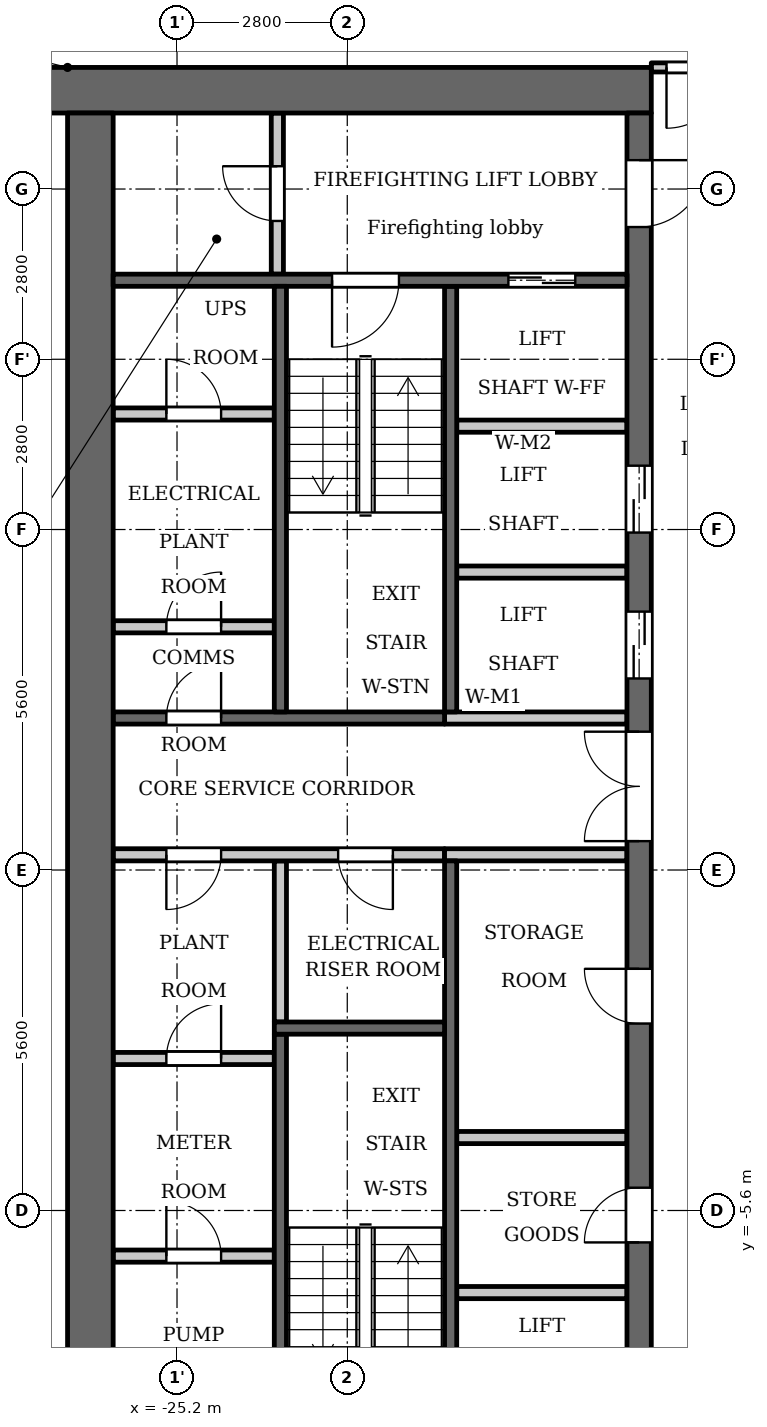
"""IFC4 building model, lengths in metres.
Left out: names, types, materials, properties, quantities, classifications, styles, units other than length and angle.
Written with IfcOpenShell. Run it as: python <this file> out.ifc"""

import sys

from ifc_helpers import new_model, si_unit, direction, frame, frame_2d, origin, place, context, subcontext, project, spatial, rectangle, extrude, element, fill, save


model = new_model("IFC4")
c1 = context("Model", 3, precision=1e-05, world=origin(), true_north=direction((0.0, 1.0)))
c2 = subcontext(c1, "Body", "Model", "MODEL_VIEW")
j1 = project(units=[si_unit("LENGTHUNIT", "METRE"), si_unit("PLANEANGLEUNIT", "RADIAN")], contexts=[c1])
p1 = place(None, origin())
s1 = spatial("IfcSite", under=j1, at=p1, CompositionType="ELEMENT")
p2 = place(p1, origin())
s2 = spatial("IfcBuilding", under=s1, at=p2, CompositionType="ELEMENT")
p3 = place(p2, frame((0.0, 0.0, 146.6)))
s3 = spatial("IfcBuildingStorey", under=s2, at=p3, CompositionType="ELEMENT", Elevation=146.6)
p4 = place(p3, frame((-23.5, -2.5, 0.0), z_axis=(0.0, 0.0, 1.0), x_axis=(0.0, 1.0, 0.0)))
e1 = element("IfcWall", 1, at=p4, inside=s3, PredefinedType="PARTITIONING", context=c2, shape_type="SweptSolid", body=[
    extrude(rectangle(XDim=2.65, YDim=0.2, at=frame_2d((1.325, 0.0))), origin(), (0.0, 0.0, 1.0), 3.2),
])
p5 = place(p3, frame((-20.7, 2.6, 0.0), z_axis=(0.0, 0.0, 1.0), x_axis=(0.0, 1.0, 0.0)))
e2 = element("IfcWall", 2, at=p5, inside=s3, PredefinedType="SHEAR", context=c2, shape_type="SweptSolid", body=[
    extrude(rectangle(XDim=7.0, YDim=0.2, at=frame_2d((3.5, 0.0))), origin(), (0.0, 0.0, 1.0), 3.2),
])
p6 = place(p3, frame((-20.7, -9.6, 0.0), z_axis=(0.0, 0.0, 1.0), x_axis=(0.0, 1.0, 0.0)))
e3 = element("IfcWall", 3, at=p6, inside=s3, PredefinedType="SHEAR", context=c2, shape_type="SweptSolid", body=[
    extrude(rectangle(XDim=9.75, YDim=0.2, at=frame_2d((4.875, 0.0))), origin(), (0.0, 0.0, 1.0), 3.2),
])
p7 = place(p3, frame((-20.8, 2.5, 0.0), z_axis=(0.0, 0.0, 1.0), x_axis=(-1.0, 0.0, 0.0)))
e4 = element("IfcWall", 4, at=p7, inside=s3, PredefinedType="SHEAR", context=c2, shape_type="SweptSolid", body=[
    extrude(rectangle(XDim=5.45, YDim=0.2, at=frame_2d((2.725, 0.0))), origin(), (0.0, 0.0, 1.0), 3.2),
])
p8 = place(p7, frame((3.675, 0.0, 0.0)))
e5 = element("IfcOpeningElement", 5, at=p8, cuts=e4, PredefinedType="OPENING", context=c2, shape_type="SweptSolid", body=[
    extrude(rectangle(XDim=0.9, YDim=2.1, at=frame_2d((0.45, 1.05))), frame((0.0, 0.11, 0.0), z_axis=(0.0, -1.0, 0.0), x_axis=(1.0, 0.0, 0.0)), (0.0, 0.0, 1.0), 0.22),
])
p9 = place(p3, frame((-20.8, 0.25, 0.0), z_axis=(0.0, 0.0, 1.0), x_axis=(-1.0, 0.0, 0.0)))
e6 = element("IfcWall", 6, at=p9, inside=s3, PredefinedType="PARTITIONING", context=c2, shape_type="SweptSolid", body=[
    extrude(rectangle(XDim=5.45, YDim=0.2, at=frame_2d((2.725, 0.0))), origin(), (0.0, 0.0, 1.0), 3.2),
])
p10 = place(p9, frame((0.85, 0.0, 0.0)))
e7 = element("IfcOpeningElement", 7, at=p10, cuts=e6, PredefinedType="OPENING", context=c2, shape_type="SweptSolid", body=[
    extrude(rectangle(XDim=0.9, YDim=2.1, at=frame_2d((0.45, 1.05))), frame((0.0, 0.11, 0.0), z_axis=(0.0, -1.0, 0.0), x_axis=(1.0, 0.0, 0.0)), (0.0, 0.0, 1.0), 0.22),
])
p11 = place(p9, frame((3.675, 0.0, 0.0)))
e8 = element("IfcOpeningElement", 8, at=p11, cuts=e6, PredefinedType="OPENING", context=c2, shape_type="SweptSolid", body=[
    extrude(rectangle(XDim=0.9, YDim=2.1, at=frame_2d((0.45, 1.05))), frame((0.0, 0.11, 0.0), z_axis=(0.0, -1.0, 0.0), x_axis=(1.0, 0.0, 0.0)), (0.0, 0.0, 1.0), 0.22),
])
p12 = place(p3, frame((-17.4, 12.825, 0.0), z_axis=(0.0, 0.0, 1.0), x_axis=(-1.0, 0.0, 0.0)))
e9 = element("IfcWall", 9, at=p12, inside=s3, PredefinedType="SHEAR", context=c2, shape_type="SweptSolid", body=[
    extrude(rectangle(XDim=10.4, YDim=0.75, at=frame_2d((5.2, 0.0))), origin(), (0.0, 0.0, 1.0), 3.2),
])
p13 = place(p3, frame((-17.8, -4.4, 0.0), z_axis=(0.0, 0.0, 1.0), x_axis=(-1.0, 0.0, 0.0)))
e10 = element("IfcWall", 10, at=p13, inside=s3, PredefinedType="PARTITIONING", context=c2, shape_type="SweptSolid", body=[
    extrude(rectangle(XDim=2.8, YDim=0.2, at=frame_2d((1.4, 0.0))), origin(), (0.0, 0.0, 1.0), 3.2),
])
p14 = place(p3, frame((-17.6, -12.45, 0.0), z_axis=(0.0, 0.0, 1.0), x_axis=(0.0, 1.0, 0.0)))
e11 = element("IfcWall", 11, at=p14, inside=s3, PredefinedType="SHEAR", context=c2, shape_type="SweptSolid", body=[
    extrude(rectangle(XDim=24.9, YDim=0.4, at=frame_2d((12.45, 0.0))), origin(), (0.0, 0.0, 1.0), 3.2),
])
p15 = place(p14, frame((6.325, 0.0, 0.0)))
e12 = element("IfcOpeningElement", 12, at=p15, cuts=e11, PredefinedType="OPENING", context=c2, shape_type="SweptSolid", body=[
    extrude(rectangle(XDim=0.9, YDim=2.1, at=frame_2d((0.45, 1.05))), frame((0.0, 0.21, 0.0), z_axis=(0.0, -1.0, 0.0), x_axis=(1.0, 0.0, 0.0)), (0.0, 0.0, 1.0), 0.42),
])
p16 = place(p14, frame((9.925, 0.0, 0.0)))
e13 = element("IfcOpeningElement", 13, at=p16, cuts=e11, PredefinedType="OPENING", context=c2, shape_type="SweptSolid", body=[
    extrude(rectangle(XDim=0.9, YDim=2.1, at=frame_2d((0.45, 1.05))), frame((0.0, 0.21, 0.0), z_axis=(0.0, -1.0, 0.0), x_axis=(1.0, 0.0, 0.0)), (0.0, 0.0, 1.0), 0.42),
])
p17 = place(p14, frame((15.6, 0.0, 0.0)))
e14 = element("IfcOpeningElement", 14, at=p17, cuts=e11, PredefinedType="OPENING", context=c2, shape_type="SweptSolid", body=[
    extrude(rectangle(XDim=1.1, YDim=2.1, at=frame_2d((0.55, 1.05))), frame((0.0, 0.21, 0.0), z_axis=(0.0, -1.0, 0.0), x_axis=(1.0, 0.0, 0.0)), (0.0, 0.0, 1.0), 0.42),
])
p18 = place(p14, frame((18.0, 0.0, 0.0)))
e15 = element("IfcOpeningElement", 15, at=p18, cuts=e11, PredefinedType="OPENING", context=c2, shape_type="SweptSolid", body=[
    extrude(rectangle(XDim=1.1, YDim=2.1, at=frame_2d((0.55, 1.05))), frame((0.0, 0.21, 0.0), z_axis=(0.0, -1.0, 0.0), x_axis=(1.0, 0.0, 0.0)), (0.0, 0.0, 1.0), 0.42),
])
p19 = place(p14, frame((23.025, 0.0, 0.0)))
e16 = element("IfcOpeningElement", 16, at=p19, cuts=e11, PredefinedType="OPENING", context=c2, shape_type="SweptSolid", body=[
    extrude(rectangle(XDim=1.1, YDim=2.1, at=frame_2d((0.55, 1.05))), frame((0.0, 0.21, 0.0), z_axis=(0.0, -1.0, 0.0), x_axis=(1.0, 0.0, 0.0)), (0.0, 0.0, 1.0), 0.42),
])
p20 = place(p14, frame((0.775, 0.0, 0.0)))
e17 = element("IfcOpeningElement", 17, at=p20, cuts=e11, PredefinedType="OPENING", context=c2, shape_type="SweptSolid", body=[
    extrude(rectangle(XDim=1.1, YDim=2.1, at=frame_2d((0.55, 1.05))), frame((0.0, 0.21, 0.0), z_axis=(0.0, -1.0, 0.0), x_axis=(1.0, 0.0, 0.0)), (0.0, 0.0, 1.0), 0.42),
])
p21 = place(p14, frame((12.925, 0.0, 0.0)))
e18 = element("IfcOpeningElement", 18, at=p21, cuts=e11, PredefinedType="OPENING", context=c2, shape_type="SweptSolid", body=[
    extrude(rectangle(XDim=1.8, YDim=2.1, at=frame_2d((0.9, 1.05))), frame((0.0, 0.21, 0.0), z_axis=(0.0, -1.0, 0.0), x_axis=(1.0, 0.0, 0.0)), (0.0, 0.0, 1.0), 0.42),
])
p22 = place(p3, frame((-26.625, -12.45, 0.0), z_axis=(0.0, 0.0, 1.0), x_axis=(0.0, 1.0, 0.0)))
e19 = element("IfcWall", 19, at=p22, inside=s3, PredefinedType="SHEAR", context=c2, shape_type="SweptSolid", body=[
    extrude(rectangle(XDim=24.9, YDim=0.75, at=frame_2d((12.45, 0.0))), origin(), (0.0, 0.0, 1.0), 3.2),
])
p23 = place(p3, frame((-23.55, 9.8, 0.0), z_axis=(0.0, 0.0, 1.0), x_axis=(0.0, 1.0, 0.0)))
e20 = element("IfcWall", 20, at=p23, inside=s3, PredefinedType="PARTITIONING", context=c2, shape_type="SweptSolid", body=[
    extrude(rectangle(XDim=2.65, YDim=0.2, at=frame_2d((1.325, 0.0))), origin(), (0.0, 0.0, 1.0), 3.2),
])
p24 = place(p23, frame((0.875, 0.0, 0.0)))
e21 = element("IfcOpeningElement", 21, at=p24, cuts=e20, PredefinedType="OPENING", context=c2, shape_type="SweptSolid", body=[
    extrude(rectangle(XDim=0.9, YDim=2.1, at=frame_2d((0.45, 1.05))), frame((0.0, 0.11, 0.0), z_axis=(0.0, -1.0, 0.0), x_axis=(1.0, 0.0, 0.0)), (0.0, 0.0, 1.0), 0.22),
])
p25 = place(p3, frame((-23.6, -6.35, 0.0), z_axis=(0.0, 0.0, 1.0), x_axis=(-1.0, 0.0, 0.0)))
e22 = element("IfcWall", 22, at=p25, inside=s3, PredefinedType="PARTITIONING", context=c2, shape_type="SweptSolid", body=[
    extrude(rectangle(XDim=2.65, YDim=0.2, at=frame_2d((1.325, 0.0))), origin(), (0.0, 0.0, 1.0), 3.2),
])
p26 = place(p25, frame((0.875, 0.0, 0.0)))
e23 = element("IfcOpeningElement", 23, at=p26, cuts=e22, PredefinedType="OPENING", context=c2, shape_type="SweptSolid", body=[
    extrude(rectangle(XDim=0.9, YDim=2.1, at=frame_2d((0.45, 1.05))), frame((0.0, 0.11, 0.0), z_axis=(0.0, -1.0, 0.0), x_axis=(1.0, 0.0, 0.0)), (0.0, 0.0, 1.0), 0.22),
])
p27 = place(p3, frame((-23.6, -3.1, 0.0), z_axis=(0.0, 0.0, 1.0), x_axis=(-1.0, 0.0, 0.0)))
e24 = element("IfcWall", 24, at=p27, inside=s3, PredefinedType="PARTITIONING", context=c2, shape_type="SweptSolid", body=[
    extrude(rectangle(XDim=2.65, YDim=0.2, at=frame_2d((1.325, 0.0))), origin(), (0.0, 0.0, 1.0), 3.2),
])
p28 = place(p27, frame((0.875, 0.0, 0.0)))
e25 = element("IfcOpeningElement", 25, at=p28, cuts=e24, PredefinedType="OPENING", context=c2, shape_type="SweptSolid", body=[
    extrude(rectangle(XDim=0.9, YDim=2.1, at=frame_2d((0.45, 1.05))), frame((0.0, 0.11, 0.0), z_axis=(0.0, -1.0, 0.0), x_axis=(1.0, 0.0, 0.0)), (0.0, 0.0, 1.0), 0.22),
])
p29 = place(p3, frame((-23.6, 4.0, 0.0), z_axis=(0.0, 0.0, 1.0), x_axis=(-1.0, 0.0, 0.0)))
e26 = element("IfcWall", 26, at=p29, inside=s3, PredefinedType="PARTITIONING", context=c2, shape_type="SweptSolid", body=[
    extrude(rectangle(XDim=2.65, YDim=0.2, at=frame_2d((1.325, 0.0))), origin(), (0.0, 0.0, 1.0), 3.2),
])
p30 = place(p29, frame((0.875, 0.0, 0.0)))
e27 = element("IfcOpeningElement", 27, at=p30, cuts=e26, PredefinedType="OPENING", context=c2, shape_type="SweptSolid", body=[
    extrude(rectangle(XDim=0.9, YDim=2.1, at=frame_2d((0.45, 1.05))), frame((0.0, 0.11, 0.0), z_axis=(0.0, -1.0, 0.0), x_axis=(1.0, 0.0, 0.0)), (0.0, 0.0, 1.0), 0.22),
])
p31 = place(p3, frame((-23.6, 7.5, 0.0), z_axis=(0.0, 0.0, 1.0), x_axis=(-1.0, 0.0, 0.0)))
e28 = element("IfcWall", 28, at=p31, inside=s3, PredefinedType="PARTITIONING", context=c2, shape_type="SweptSolid", body=[
    extrude(rectangle(XDim=2.65, YDim=0.2, at=frame_2d((1.325, 0.0))), origin(), (0.0, 0.0, 1.0), 3.2),
])
p32 = place(p31, frame((0.875, 0.0, 0.0)))
e29 = element("IfcOpeningElement", 29, at=p32, cuts=e28, PredefinedType="OPENING", context=c2, shape_type="SweptSolid", body=[
    extrude(rectangle(XDim=0.9, YDim=2.1, at=frame_2d((0.45, 1.05))), frame((0.0, 0.11, 0.0), z_axis=(0.0, -1.0, 0.0), x_axis=(1.0, 0.0, 0.0)), (0.0, 0.0, 1.0), 0.22),
])
p33 = place(p3, frame((-17.8, -6.95, 0.0), z_axis=(0.0, 0.0, 1.0), x_axis=(-1.0, 0.0, 0.0)))
e30 = element("IfcWall", 30, at=p33, inside=s3, PredefinedType="PARTITIONING", context=c2, shape_type="SweptSolid", body=[
    extrude(rectangle(XDim=2.8, YDim=0.2, at=frame_2d((1.4, 0.0))), origin(), (0.0, 0.0, 1.0), 3.2),
])
for number, where, z_axis, x_axis in (
    (31, (-17.8, 0.25, 0.0), (0.0, 0.0, 1.0), (-1.0, 0.0, 0.0)),
    (32, (-17.8, 2.5, 0.0), (0.0, 0.0, 1.0), (-1.0, 0.0, 0.0)),
):
    element("IfcWall", number, at=place(p3, frame(where, z_axis=z_axis, x_axis=x_axis)), inside=s3, PredefinedType="PARTITIONING", context=c2, shape_type="SweptSolid", body=[
        extrude(rectangle(XDim=3.0, YDim=0.2, at=frame_2d((1.5, 0.0))), origin(), (0.0, 0.0, 1.0), 3.2),
    ])
for number, where, z_axis, x_axis in (
    (33, (-17.8, 4.9, 0.0), (0.0, 0.0, 1.0), (-1.0, 0.0, 0.0)),
    (34, (-17.8, 7.3, 0.0), (0.0, 0.0, 1.0), (-1.0, 0.0, 0.0)),
):
    element("IfcWall", number, at=place(p3, frame(where, z_axis=z_axis, x_axis=x_axis)), inside=s3, PredefinedType="PARTITIONING", context=c2, shape_type="SweptSolid", body=[
        extrude(rectangle(XDim=2.8, YDim=0.2, at=frame_2d((1.4, 0.0))), origin(), (0.0, 0.0, 1.0), 3.2),
    ])
p34 = place(p3, frame((-17.8, 9.7, 0.0), z_axis=(0.0, 0.0, 1.0), x_axis=(-1.0, 0.0, 0.0)))
e35 = element("IfcWall", 35, at=p34, inside=s3, PredefinedType="SHEAR", context=c2, shape_type="SweptSolid", body=[
    extrude(rectangle(XDim=8.45, YDim=0.2, at=frame_2d((4.225, 0.0))), origin(), (0.0, 0.0, 1.0), 3.2),
])
p35 = place(p34, frame((0.85, 0.0, 0.0)))
e36 = element("IfcOpeningElement", 36, at=p35, cuts=e35, PredefinedType="OPENING", context=c2, shape_type="SweptSolid", body=[
    extrude(rectangle(XDim=1.1, YDim=2.1, at=frame_2d((0.55, 1.05))), frame((0.0, 0.11, 0.0), z_axis=(0.0, -1.0, 0.0), x_axis=(1.0, 0.0, 0.0)), (0.0, 0.0, 1.0), 0.22),
])
p36 = place(p34, frame((3.75, 0.0, 0.0)))
e37 = element("IfcOpeningElement", 37, at=p36, cuts=e35, PredefinedType="OPENING", context=c2, shape_type="SweptSolid", body=[
    extrude(rectangle(XDim=1.1, YDim=2.1, at=frame_2d((0.55, 1.05))), frame((0.0, 0.11, 0.0), z_axis=(0.0, -1.0, 0.0), x_axis=(1.0, 0.0, 0.0)), (0.0, 0.0, 1.0), 0.22),
])
p37 = place(p3, frame((-23.5, 2.6, 0.0), z_axis=(0.0, 0.0, 1.0), x_axis=(0.0, 1.0, 0.0)))
e38 = element("IfcWall", 38, at=p37, inside=s3, PredefinedType="SHEAR", context=c2, shape_type="SweptSolid", body=[
    extrude(rectangle(XDim=7.0, YDim=0.2, at=frame_2d((3.5, 0.0))), origin(), (0.0, 0.0, 1.0), 3.2),
])
p38 = place(p3, frame((-23.5, -9.6, 0.0), z_axis=(0.0, 0.0, 1.0), x_axis=(0.0, 1.0, 0.0)))
e39 = element("IfcWall", 39, at=p38, inside=s3, PredefinedType="SHEAR", context=c2, shape_type="SweptSolid", body=[
    extrude(rectangle(XDim=6.9, YDim=0.2, at=frame_2d((3.45, 0.0))), origin(), (0.0, 0.0, 1.0), 3.2),
])
p39 = place(p3, frame((-20.8, -2.6, 0.0), z_axis=(0.0, 0.0, 1.0), x_axis=(-1.0, 0.0, 0.0)))
e40 = element("IfcWall", 40, at=p39, inside=s3, PredefinedType="SHEAR", context=c2, shape_type="SweptSolid", body=[
    extrude(rectangle(XDim=2.8, YDim=0.2, at=frame_2d((1.4, 0.0))), origin(), (0.0, 0.0, 1.0), 3.2),
])
p40 = place(p3, frame((-17.4, 13.2, 0.0), z_axis=(0.0, 0.0, 1.0), x_axis=(1.0, 0.0, 0.0)))
e41 = element("IfcWall", 41, at=p40, inside=s3, PredefinedType="PARTITIONING", context=c2, shape_type="SweptSolid", body=[
    extrude(rectangle(XDim=34.8, YDim=0.15, at=frame_2d((17.4, 0.0))), origin(), (0.0, 0.0, 1.0), 3.2),
])
p41 = place(p40, frame((0.25, 0.0, 0.0)))
e42 = element("IfcOpeningElement", 42, at=p41, cuts=e41, PredefinedType="OPENING", context=c2, shape_type="SweptSolid", body=[
    extrude(rectangle(XDim=1.0, YDim=2.1, at=frame_2d((0.5, 1.05))), frame((0.0, 0.085, 0.0), z_axis=(0.0, -1.0, 0.0), x_axis=(1.0, 0.0, 0.0)), (0.0, 0.0, 1.0), 0.17),
])
p42 = place(p40, frame((33.65, 0.0, 0.0)))
e43 = element("IfcOpeningElement", 43, at=p42, cuts=e41, PredefinedType="OPENING", context=c2, shape_type="SweptSolid", body=[
    extrude(rectangle(XDim=1.0, YDim=2.1, at=frame_2d((0.5, 1.05))), frame((0.0, 0.085, 0.0), z_axis=(0.0, -1.0, 0.0), x_axis=(1.0, 0.0, 0.0)), (0.0, 0.0, 1.0), 0.17),
])
p43 = place(p40, frame((13.75, 0.0, 0.0)))
e44 = element("IfcOpeningElement", 44, at=p43, cuts=e41, PredefinedType="OPENING", context=c2, shape_type="SweptSolid", body=[
    extrude(rectangle(XDim=1.0, YDim=2.1, at=frame_2d((0.5, 1.05))), frame((0.0, 0.085, 0.0), z_axis=(0.0, -1.0, 0.0), x_axis=(1.0, 0.0, 0.0)), (0.0, 0.0, 1.0), 0.17),
])
p44 = place(p15, origin())
e45 = element("IfcDoor", 45, at=p44, inside=s3, OperationType="SINGLE_SWING_RIGHT", PredefinedType="DOOR", context=c2, shape_type="SweptSolid", body=[
    extrude(rectangle(XDim=0.9, YDim=2.1, at=frame_2d((0.45, 1.05))), frame((0.0, 0.025, 0.0), z_axis=(0.0, -1.0, 0.0), x_axis=(1.0, 0.0, 0.0)), (0.0, 0.0, 1.0), 0.05),
])
fill(e12, e45)
p45 = place(p16, origin())
e46 = element("IfcDoor", 46, at=p45, inside=s3, OperationType="SINGLE_SWING_LEFT", PredefinedType="DOOR", context=c2, shape_type="SweptSolid", body=[
    extrude(rectangle(XDim=0.9, YDim=2.1, at=frame_2d((0.45, 1.05))), frame((0.0, 0.025, 0.0), z_axis=(0.0, -1.0, 0.0), x_axis=(1.0, 0.0, 0.0)), (0.0, 0.0, 1.0), 0.05),
])
fill(e13, e46)
p46 = place(p17, origin())
e47 = element("IfcDoor", 47, at=p46, inside=s3, OperationType="DOUBLE_DOOR_SLIDING", PredefinedType="DOOR", context=c2, shape_type="SweptSolid", body=[
    extrude(rectangle(XDim=1.1, YDim=2.1, at=frame_2d((0.55, 1.05))), frame((0.0, 0.025, 0.0), z_axis=(0.0, -1.0, 0.0), x_axis=(1.0, 0.0, 0.0)), (0.0, 0.0, 1.0), 0.05),
])
fill(e14, e47)
p47 = place(p18, origin())
e48 = element("IfcDoor", 48, at=p47, inside=s3, OperationType="DOUBLE_DOOR_SLIDING", PredefinedType="DOOR", context=c2, shape_type="SweptSolid", body=[
    extrude(rectangle(XDim=1.1, YDim=2.1, at=frame_2d((0.55, 1.05))), frame((0.0, 0.025, 0.0), z_axis=(0.0, -1.0, 0.0), x_axis=(1.0, 0.0, 0.0)), (0.0, 0.0, 1.0), 0.05),
])
fill(e15, e48)
p48 = place(p35, origin())
e49 = element("IfcDoor", 49, at=p48, inside=s3, OperationType="DOUBLE_DOOR_SLIDING", PredefinedType="DOOR", context=c2, shape_type="SweptSolid", body=[
    extrude(rectangle(XDim=1.1, YDim=2.1, at=frame_2d((0.55, 1.05))), frame((0.0, 0.025, 0.0), z_axis=(0.0, -1.0, 0.0), x_axis=(1.0, 0.0, 0.0)), (0.0, 0.0, 1.0), 0.05),
])
fill(e36, e49)
p49 = place(p19, origin())
e50 = element("IfcDoor", 50, at=p49, inside=s3, OperationType="SINGLE_SWING_RIGHT", PredefinedType="DOOR", context=c2, shape_type="SweptSolid", body=[
    extrude(rectangle(XDim=1.1, YDim=2.1, at=frame_2d((0.55, 1.05))), frame((0.0, 0.025, 0.0), z_axis=(0.0, -1.0, 0.0), x_axis=(1.0, 0.0, 0.0)), (0.0, 0.0, 1.0), 0.05),
])
fill(e16, e50)
p50 = place(p24, origin())
e51 = element("IfcDoor", 51, at=p50, inside=s3, OperationType="SINGLE_SWING_LEFT", PredefinedType="DOOR", context=c2, shape_type="SweptSolid", body=[
    extrude(rectangle(XDim=0.9, YDim=2.1, at=frame_2d((0.45, 1.05))), frame((0.0, 0.025, 0.0), z_axis=(0.0, -1.0, 0.0), x_axis=(1.0, 0.0, 0.0)), (0.0, 0.0, 1.0), 0.05),
])
fill(e21, e51)
p51 = place(p36, origin())
e52 = element("IfcDoor", 52, at=p51, inside=s3, OperationType="SINGLE_SWING_LEFT", PredefinedType="DOOR", context=c2, shape_type="SweptSolid", body=[
    extrude(rectangle(XDim=1.1, YDim=2.1, at=frame_2d((0.55, 1.05))), frame((0.0, 0.025, 0.0), z_axis=(0.0, -1.0, 0.0), x_axis=(1.0, 0.0, 0.0)), (0.0, 0.0, 1.0), 0.05),
])
fill(e37, e52)
p52 = place(p21, origin())
e53 = element("IfcDoor", 53, at=p52, inside=s3, OperationType="DOUBLE_DOOR_SINGLE_SWING", PredefinedType="DOOR", context=c2, shape_type="SweptSolid", body=[
    extrude(rectangle(XDim=1.8, YDim=2.1, at=frame_2d((0.9, 1.05))), frame((0.0, 0.025, 0.0), z_axis=(0.0, -1.0, 0.0), x_axis=(1.0, 0.0, 0.0)), (0.0, 0.0, 1.0), 0.05),
])
fill(e18, e53)
p53 = place(p10, origin())
e54 = element("IfcDoor", 54, at=p53, inside=s3, OperationType="SINGLE_SWING_RIGHT", PredefinedType="DOOR", context=c2, shape_type="SweptSolid", body=[
    extrude(rectangle(XDim=0.9, YDim=2.1, at=frame_2d((0.45, 1.05))), frame((0.0, 0.025, 0.0), z_axis=(0.0, -1.0, 0.0), x_axis=(1.0, 0.0, 0.0)), (0.0, 0.0, 1.0), 0.05),
])
fill(e7, e54)
p54 = place(p26, origin())
e55 = element("IfcDoor", 55, at=p54, inside=s3, OperationType="SINGLE_SWING_RIGHT", PredefinedType="DOOR", context=c2, shape_type="SweptSolid", body=[
    extrude(rectangle(XDim=0.9, YDim=2.1, at=frame_2d((0.45, 1.05))), frame((0.0, 0.025, 0.0), z_axis=(0.0, -1.0, 0.0), x_axis=(1.0, 0.0, 0.0)), (0.0, 0.0, 1.0), 0.05),
])
fill(e23, e55)
p55 = place(p28, origin())
e56 = element("IfcDoor", 56, at=p55, inside=s3, OperationType="SINGLE_SWING_LEFT", PredefinedType="DOOR", context=c2, shape_type="SweptSolid", body=[
    extrude(rectangle(XDim=0.9, YDim=2.1, at=frame_2d((0.45, 1.05))), frame((0.0, 0.025, 0.0), z_axis=(0.0, -1.0, 0.0), x_axis=(1.0, 0.0, 0.0)), (0.0, 0.0, 1.0), 0.05),
])
fill(e25, e56)
p56 = place(p11, origin())
e57 = element("IfcDoor", 57, at=p56, inside=s3, OperationType="SINGLE_SWING_LEFT", PredefinedType="DOOR", context=c2, shape_type="SweptSolid", body=[
    extrude(rectangle(XDim=0.9, YDim=2.1, at=frame_2d((0.45, 1.05))), frame((0.0, 0.025, 0.0), z_axis=(0.0, -1.0, 0.0), x_axis=(1.0, 0.0, 0.0)), (0.0, 0.0, 1.0), 0.05),
])
fill(e8, e57)
p57 = place(p30, origin())
e58 = element("IfcDoor", 58, at=p57, inside=s3, OperationType="SINGLE_SWING_LEFT", PredefinedType="DOOR", context=c2, shape_type="SweptSolid", body=[
    extrude(rectangle(XDim=0.9, YDim=2.1, at=frame_2d((0.45, 1.05))), frame((0.0, 0.025, 0.0), z_axis=(0.0, -1.0, 0.0), x_axis=(1.0, 0.0, 0.0)), (0.0, 0.0, 1.0), 0.05),
])
fill(e27, e58)
p58 = place(p32, origin())
e59 = element("IfcDoor", 59, at=p58, inside=s3, OperationType="SINGLE_SWING_RIGHT", PredefinedType="DOOR", context=c2, shape_type="SweptSolid", body=[
    extrude(rectangle(XDim=0.9, YDim=2.1, at=frame_2d((0.45, 1.05))), frame((0.0, 0.025, 0.0), z_axis=(0.0, -1.0, 0.0), x_axis=(1.0, 0.0, 0.0)), (0.0, 0.0, 1.0), 0.05),
])
fill(e29, e59)
p59 = place(p8, origin())
e60 = element("IfcDoor", 60, at=p59, inside=s3, OperationType="SINGLE_SWING_LEFT", PredefinedType="DOOR", context=c2, shape_type="SweptSolid", body=[
    extrude(rectangle(XDim=0.9, YDim=2.1, at=frame_2d((0.45, 1.05))), frame((0.0, 0.025, 0.0), z_axis=(0.0, -1.0, 0.0), x_axis=(1.0, 0.0, 0.0)), (0.0, 0.0, 1.0), 0.05),
])
fill(e5, e60)
p60 = place(p41, origin())
e61 = element("IfcDoor", 61, at=p60, inside=s3, OperationType="SINGLE_SWING_LEFT", PredefinedType="DOOR", context=c2, shape_type="SweptSolid", body=[
    extrude(rectangle(XDim=1.0, YDim=2.1, at=frame_2d((0.5, 1.05))), frame((0.0, 0.025, 0.0), z_axis=(0.0, -1.0, 0.0), x_axis=(1.0, 0.0, 0.0)), (0.0, 0.0, 1.0), 0.05),
])
fill(e42, e61)
save(model, sys.argv[1])
